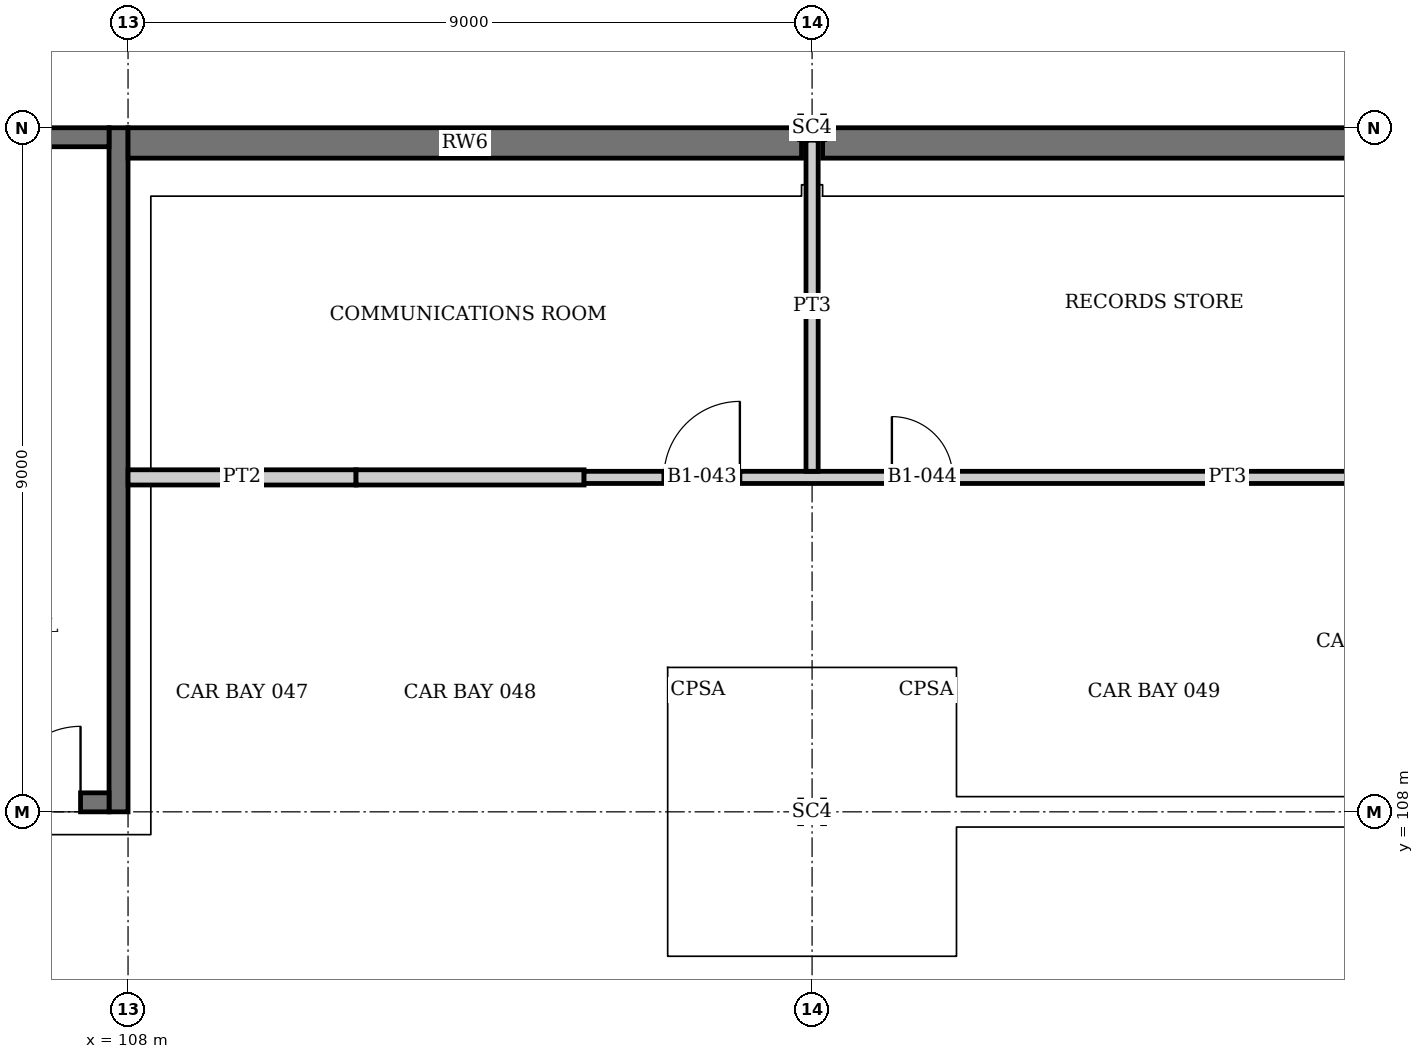
"""IFC4 building model, lengths in metres.
Left out: names, types, materials, properties, quantities, classifications, styles, units other than length and angle.
Written with IfcOpenShell. Run it as: python <this file> out.ifc"""

import sys

from ifc_helpers import new_model, si_unit, direction, frame, frame_2d, origin, origin_2d, place, context, subcontext, project, spatial, rectangle, i_section, extrude, element, fill, save


model = new_model("IFC4")
c1 = context("Model", 3, precision=1e-05, world=origin(), true_north=direction((0.0, 1.0)))
c2 = subcontext(c1, "Body", "Model", "MODEL_VIEW")
j1 = project(units=[si_unit("LENGTHUNIT", "METRE"), si_unit("PLANEANGLEUNIT", "RADIAN")], contexts=[c1])
p1 = place(None, origin())
s1 = spatial("IfcSite", under=j1, at=p1, CompositionType="ELEMENT")
p2 = place(p1, origin())
s2 = spatial("IfcBuilding", under=s1, at=p2, CompositionType="ELEMENT")
p3 = place(p2, frame((0.0, 0.0, -4.5)))
s3 = spatial("IfcBuildingStorey", under=s2, at=p3, CompositionType="ELEMENT", Elevation=-4.5)
for number, where, z_axis, x_axis in (
    (1, (117.0, 108.0, 0.0), (0.0, 0.0, 1.0), (0.0, 1.0, 0.0)),
    (2, (117.0, 117.0, 0.0), (0.0, 0.0, 1.0), (0.0, 1.0, 0.0)),
):
    element("IfcColumn", number, at=place(p3, frame(where, z_axis=z_axis, x_axis=x_axis)), inside=s3, PredefinedType="COLUMN", context=c2, shape_type="SweptSolid", body=[
        extrude(i_section(OverallWidth=0.311, OverallDepth=0.327, WebThickness=0.016, FlangeThickness=0.025, at=origin_2d()), origin(), (0.0, 0.0, 1.0), 4.5),
    ])
p4 = place(p3, frame((107.875, 108.0, 0.0), z_axis=(0.0, 0.0, 1.0), x_axis=(0.0, 1.0, 0.0)))
e3 = element("IfcWall", 3, at=p4, inside=s3, PredefinedType="SHEAR", context=c2, shape_type="SweptSolid", body=[
    extrude(rectangle(XDim=9.0, YDim=0.25, at=frame_2d((4.5, 0.0))), origin(), (0.0, 0.0, 1.0), 4.5),
])
p5 = place(p3, frame((99.25, 108.125, 0.0), z_axis=(0.0, 0.0, 1.0), x_axis=(1.0, 0.0, 0.0)))
e4 = element("IfcWall", 4, at=p5, inside=s3, PredefinedType="SHEAR", context=c2, shape_type="SweptSolid", body=[
    extrude(rectangle(XDim=8.5, YDim=0.25, at=frame_2d((4.25, 0.0))), origin(), (0.0, 0.0, 1.0), 4.5),
])
p6 = place(p5, frame((7.125, 0.0, 0.0)))
e5 = element("IfcOpeningElement", 5, at=p6, cuts=e4, PredefinedType="OPENING", context=c2, shape_type="SweptSolid", body=[
    extrude(rectangle(XDim=1.0, YDim=2.1, at=frame_2d((0.5, 1.05))), frame((0.0, 0.135, 0.0), z_axis=(0.0, -1.0, 0.0), x_axis=(1.0, 0.0, 0.0)), (0.0, 0.0, 1.0), 0.27),
])
p7 = place(p3, frame((99.25, 116.875, 0.0), z_axis=(0.0, 0.0, 1.0), x_axis=(1.0, 0.0, 0.0)))
e6 = element("IfcWall", 6, at=p7, inside=s3, PredefinedType="SHEAR", context=c2, shape_type="SweptSolid", body=[
    extrude(rectangle(XDim=8.5, YDim=0.25, at=frame_2d((4.25, 0.0))), origin(), (0.0, 0.0, 1.0), 4.5),
])
p8 = place(p3, frame((108.0, 116.8, 0.0), z_axis=(0.0, 0.0, 1.0), x_axis=(1.0, 0.0, 0.0)))
e7 = element("IfcWall", 7, at=p8, inside=s3, PredefinedType="SOLIDWALL", context=c2, shape_type="SweptSolid", body=[
    extrude(rectangle(XDim=8.862, YDim=0.4, at=frame_2d((4.431, 0.0))), origin(), (0.0, 0.0, 1.0), 4.5),
])
p9 = place(p3, frame((117.138, 116.8, 0.0), z_axis=(0.0, 0.0, 1.0), x_axis=(1.0, 0.0, 0.0)))
e8 = element("IfcWall", 8, at=p9, inside=s3, PredefinedType="SOLIDWALL", context=c2, shape_type="SweptSolid", body=[
    extrude(rectangle(XDim=8.723, YDim=0.4, at=frame_2d((4.362, 0.0))), origin(), (0.0, 0.0, 1.0), 4.5),
])
p10 = place(p3, frame((108.0, 112.4, 0.0), z_axis=(0.0, 0.0, 1.0), x_axis=(1.0, 0.0, 0.0)))
e9 = element("IfcWall", 9, at=p10, inside=s3, PredefinedType="PARTITIONING", context=c2, shape_type="SweptSolid", body=[
    extrude(rectangle(XDim=3.0, YDim=0.2, at=frame_2d((1.5, 0.0))), origin(), (0.0, 0.0, 1.0), 4.25),
])
p11 = place(p3, frame((111.0, 112.4, 0.0), z_axis=(0.0, 0.0, 1.0), x_axis=(1.0, 0.0, 0.0)))
e10 = element("IfcWall", 10, at=p11, inside=s3, PredefinedType="PARTITIONING", context=c2, shape_type="SweptSolid", body=[
    extrude(rectangle(XDim=3.0, YDim=0.2, at=frame_2d((1.5, 0.0))), origin(), (0.0, 0.0, 1.0), 3.79),
])
p12 = place(p3, frame((114.0, 112.4, 0.0), z_axis=(0.0, 0.0, 1.0), x_axis=(1.0, 0.0, 0.0)))
e11 = element("IfcWall", 11, at=p12, inside=s3, PredefinedType="PARTITIONING", context=c2, shape_type="SweptSolid", body=[
    extrude(rectangle(XDim=12.08, YDim=0.16, at=frame_2d((6.04, 0.0))), origin(), (0.0, 0.0, 1.0), 3.79),
])
p13 = place(p12, frame((1.05, 0.0, 0.0)))
e12 = element("IfcOpeningElement", 12, at=p13, cuts=e11, PredefinedType="OPENING", context=c2, shape_type="SweptSolid", body=[
    extrude(rectangle(XDim=1.0, YDim=2.4, at=frame_2d((0.5, 1.2))), frame((0.0, 0.09, 0.0), z_axis=(0.0, -1.0, 0.0), x_axis=(1.0, 0.0, 0.0)), (0.0, 0.0, 1.0), 0.18),
])
p14 = place(p12, frame((4.05, 0.0, 0.0)))
e13 = element("IfcOpeningElement", 13, at=p14, cuts=e11, PredefinedType="OPENING", context=c2, shape_type="SweptSolid", body=[
    extrude(rectangle(XDim=0.8, YDim=2.0, at=frame_2d((0.4, 1.0))), frame((0.0, 0.09, 0.0), z_axis=(0.0, -1.0, 0.0), x_axis=(1.0, 0.0, 0.0)), (0.0, 0.0, 1.0), 0.18),
])
p15 = place(p3, frame((117.0, 112.48, 0.0), z_axis=(0.0, 0.0, 1.0), x_axis=(0.0, 1.0, 0.0)))
e14 = element("IfcWall", 14, at=p15, inside=s3, PredefinedType="PARTITIONING", context=c2, shape_type="SweptSolid", body=[
    extrude(rectangle(XDim=4.356, YDim=0.16, at=frame_2d((2.178, 0.0))), origin(), (0.0, 0.0, 1.0), 3.79),
])
p16 = place(p6, origin())
e15 = element("IfcDoor", 15, at=p16, inside=s3, OperationType="SINGLE_SWING_RIGHT", PredefinedType="DOOR", context=c2, shape_type="SweptSolid", body=[
    extrude(rectangle(XDim=1.0, YDim=2.1, at=frame_2d((0.5, 1.05))), frame((0.0, 0.025, 0.0), z_axis=(0.0, -1.0, 0.0), x_axis=(1.0, 0.0, 0.0)), (0.0, 0.0, 1.0), 0.05),
])
fill(e5, e15)
p17 = place(p13, origin())
e16 = element("IfcDoor", 16, at=p17, inside=s3, OperationType="SINGLE_SWING_RIGHT", PredefinedType="DOOR", context=c2, shape_type="SweptSolid", body=[
    extrude(rectangle(XDim=1.0, YDim=2.4, at=frame_2d((0.5, 1.2))), frame((0.0, 0.025, 0.0), z_axis=(0.0, -1.0, 0.0), x_axis=(1.0, 0.0, 0.0)), (0.0, 0.0, 1.0), 0.05),
])
fill(e12, e16)
p18 = place(p14, origin())
e17 = element("IfcDoor", 17, at=p18, inside=s3, OperationType="SINGLE_SWING_LEFT", PredefinedType="DOOR", context=c2, shape_type="SweptSolid", body=[
    extrude(rectangle(XDim=0.8, YDim=2.0, at=frame_2d((0.4, 1.0))), frame((0.0, 0.025, 0.0), z_axis=(0.0, -1.0, 0.0), x_axis=(1.0, 0.0, 0.0)), (0.0, 0.0, 1.0), 0.05),
])
fill(e13, e17)
save(model, sys.argv[1])
